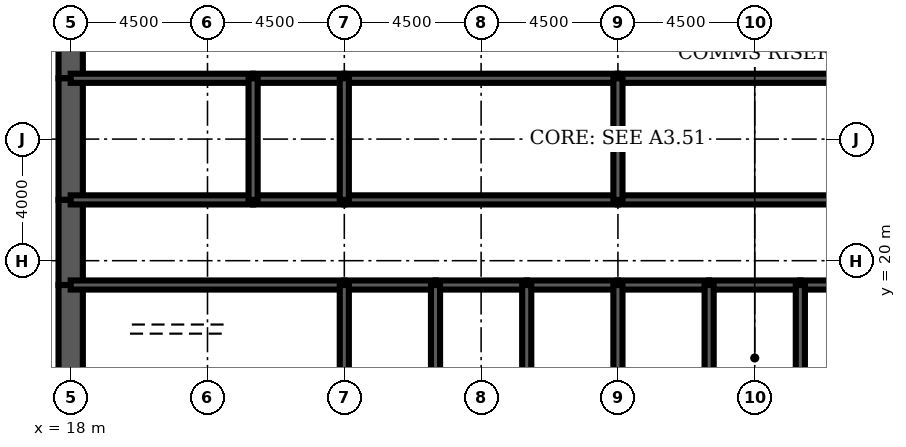
"""IFC4 building model, lengths in metres.
Left out: names, types, materials, properties, quantities, classifications, styles, units other than length and angle.
Written with IfcOpenShell. Run it as: python <this file> out.ifc"""

import sys

from ifc_helpers import new_model, si_unit, direction, frame, frame_2d, origin, place, context, subcontext, project, spatial, rectangle, extrude, element, fill, save


model = new_model("IFC4")
c1 = context("Model", 3, precision=1e-05, world=origin(), true_north=direction((0.0, 1.0)))
c2 = subcontext(c1, "Body", "Model", "MODEL_VIEW")
j1 = project(units=[si_unit("LENGTHUNIT", "METRE"), si_unit("PLANEANGLEUNIT", "RADIAN")], contexts=[c1])
p1 = place(None, origin())
s1 = spatial("IfcSite", under=j1, at=p1, CompositionType="ELEMENT")
p2 = place(p1, origin())
s2 = spatial("IfcBuilding", under=s1, at=p2, CompositionType="ELEMENT")
p3 = place(p2, frame((0.0, 0.0, 219.4)))
s3 = spatial("IfcBuildingStorey", under=s2, at=p3, CompositionType="ELEMENT", Elevation=219.4)
p4 = place(p3, frame((18.0, 28.8, 0.0), z_axis=(0.0, 0.0, 1.0), x_axis=(0.0, -1.0, 0.0)))
e1 = element("IfcWall", 1, at=p4, inside=s3, PredefinedType="SHEAR", context=c2, shape_type="SweptSolid", body=[
    extrude(rectangle(XDim=2.8, YDim=0.8, at=frame_2d((1.4, 0.0))), origin(), (0.0, 0.0, 1.0), 4.2),
])
p5 = place(p4, frame((0.4, 0.0, 0.0)))
e2 = element("IfcOpeningElement", 2, at=p5, cuts=e1, PredefinedType="OPENING", context=c2, shape_type="SweptSolid", body=[
    extrude(rectangle(XDim=1.8, YDim=2.1, at=frame_2d((0.9, 1.05))), frame((0.0, 0.41, 0.0), z_axis=(0.0, -1.0, 0.0), x_axis=(1.0, 0.0, 0.0)), (0.0, 0.0, 1.0), 0.82),
])
p6 = place(p3, frame((18.0, 26.0, 0.0), z_axis=(0.0, 0.0, 1.0), x_axis=(0.0, -1.0, 0.0)))
e3 = element("IfcWall", 3, at=p6, inside=s3, PredefinedType="SHEAR", context=c2, shape_type="SweptSolid", body=[
    extrude(rectangle(XDim=4.0, YDim=0.8, at=frame_2d((2.0, 0.0))), origin(), (0.0, 0.0, 1.0), 4.2),
])
p7 = place(p3, frame((18.0, 22.0, 0.0), z_axis=(0.0, 0.0, 1.0), x_axis=(0.0, -1.0, 0.0)))
e4 = element("IfcWall", 4, at=p7, inside=s3, PredefinedType="SHEAR", context=c2, shape_type="SweptSolid", body=[
    extrude(rectangle(XDim=2.8, YDim=0.8, at=frame_2d((1.4, 0.0))), origin(), (0.0, 0.0, 1.0), 4.2),
])
p8 = place(p7, frame((0.6, 0.0, 0.0)))
e5 = element("IfcOpeningElement", 5, at=p8, cuts=e4, PredefinedType="OPENING", context=c2, shape_type="SweptSolid", body=[
    extrude(rectangle(XDim=1.8, YDim=2.1, at=frame_2d((0.9, 1.05))), frame((0.0, 0.41, 0.0), z_axis=(0.0, -1.0, 0.0), x_axis=(1.0, 0.0, 0.0)), (0.0, 0.0, 1.0), 0.82),
])
p9 = place(p3, frame((18.0, 19.2, 0.0), z_axis=(0.0, 0.0, 1.0), x_axis=(0.0, -1.0, 0.0)))
e6 = element("IfcWall", 6, at=p9, inside=s3, PredefinedType="SHEAR", context=c2, shape_type="SweptSolid", body=[
    extrude(rectangle(XDim=3.2, YDim=0.8, at=frame_2d((1.6, 0.0))), origin(), (0.0, 0.0, 1.0), 4.2),
])
p10 = place(p3, frame((18.0, 19.2, 0.0), z_axis=(0.0, 0.0, 1.0), x_axis=(1.0, 0.0, 0.0)))
e7 = element("IfcWall", 7, at=p10, inside=s3, PredefinedType="SOLIDWALL", context=c2, shape_type="SweptSolid", body=[
    extrude(rectangle(XDim=9.0, YDim=0.3, at=frame_2d((4.5, 0.0))), origin(), (0.0, 0.0, 1.0), 4.2),
])
p11 = place(p10, frame((0.65, 0.0, 0.0)))
e8 = element("IfcOpeningElement", 8, at=p11, cuts=e7, PredefinedType="OPENING", context=c2, shape_type="SweptSolid", body=[
    extrude(rectangle(XDim=1.0, YDim=2.1, at=frame_2d((0.5, 1.05))), frame((0.0, 0.16, 0.0), z_axis=(0.0, -1.0, 0.0), x_axis=(1.0, 0.0, 0.0)), (0.0, 0.0, 1.0), 0.32),
])
p12 = place(p3, frame((27.0, 19.2, 0.0), z_axis=(0.0, 0.0, 1.0), x_axis=(1.0, 0.0, 0.0)))
e9 = element("IfcWall", 9, at=p12, inside=s3, PredefinedType="SOLIDWALL", context=c2, shape_type="SweptSolid", body=[
    extrude(rectangle(XDim=3.0, YDim=0.3, at=frame_2d((1.5, 0.0))), origin(), (0.0, 0.0, 1.0), 4.2),
])
p13 = place(p12, frame((0.95, 0.0, 0.0)))
e10 = element("IfcOpeningElement", 10, at=p13, cuts=e9, PredefinedType="OPENING", context=c2, shape_type="SweptSolid", body=[
    extrude(rectangle(XDim=1.1, YDim=2.2, at=frame_2d((0.55, 1.1))), frame((0.0, 0.16, 0.0), z_axis=(0.0, -1.0, 0.0), x_axis=(1.0, 0.0, 0.0)), (0.0, 0.0, 1.0), 0.32),
])
p14 = place(p3, frame((30.0, 19.2, 0.0), z_axis=(0.0, 0.0, 1.0), x_axis=(1.0, 0.0, 0.0)))
e11 = element("IfcWall", 11, at=p14, inside=s3, PredefinedType="SOLIDWALL", context=c2, shape_type="SweptSolid", body=[
    extrude(rectangle(XDim=3.0, YDim=0.3, at=frame_2d((1.5, 0.0))), origin(), (0.0, 0.0, 1.0), 4.2),
])
p15 = place(p14, frame((0.95, 0.0, 0.0)))
e12 = element("IfcOpeningElement", 12, at=p15, cuts=e11, PredefinedType="OPENING", context=c2, shape_type="SweptSolid", body=[
    extrude(rectangle(XDim=1.1, YDim=2.2, at=frame_2d((0.55, 1.1))), frame((0.0, 0.16, 0.0), z_axis=(0.0, -1.0, 0.0), x_axis=(1.0, 0.0, 0.0)), (0.0, 0.0, 1.0), 0.32),
])
p16 = place(p3, frame((33.0, 19.2, 0.0), z_axis=(0.0, 0.0, 1.0), x_axis=(1.0, 0.0, 0.0)))
e13 = element("IfcWall", 13, at=p16, inside=s3, PredefinedType="SOLIDWALL", context=c2, shape_type="SweptSolid", body=[
    extrude(rectangle(XDim=3.0, YDim=0.3, at=frame_2d((1.5, 0.0))), origin(), (0.0, 0.0, 1.0), 4.2),
])
p17 = place(p16, frame((0.95, 0.0, 0.0)))
e14 = element("IfcOpeningElement", 14, at=p17, cuts=e13, PredefinedType="OPENING", context=c2, shape_type="SweptSolid", body=[
    extrude(rectangle(XDim=1.1, YDim=2.2, at=frame_2d((0.55, 1.1))), frame((0.0, 0.16, 0.0), z_axis=(0.0, -1.0, 0.0), x_axis=(1.0, 0.0, 0.0)), (0.0, 0.0, 1.0), 0.32),
])
p18 = place(p3, frame((36.0, 19.2, 0.0), z_axis=(0.0, 0.0, 1.0), x_axis=(1.0, 0.0, 0.0)))
e15 = element("IfcWall", 15, at=p18, inside=s3, PredefinedType="SOLIDWALL", context=c2, shape_type="SweptSolid", body=[
    extrude(rectangle(XDim=3.0, YDim=0.3, at=frame_2d((1.5, 0.0))), origin(), (0.0, 0.0, 1.0), 4.2),
])
p19 = place(p18, frame((0.95, 0.0, 0.0)))
e16 = element("IfcOpeningElement", 16, at=p19, cuts=e15, PredefinedType="OPENING", context=c2, shape_type="SweptSolid", body=[
    extrude(rectangle(XDim=1.1, YDim=2.2, at=frame_2d((0.55, 1.1))), frame((0.0, 0.16, 0.0), z_axis=(0.0, -1.0, 0.0), x_axis=(1.0, 0.0, 0.0)), (0.0, 0.0, 1.0), 0.32),
])
p20 = place(p3, frame((39.0, 19.2, 0.0), z_axis=(0.0, 0.0, 1.0), x_axis=(1.0, 0.0, 0.0)))
e17 = element("IfcWall", 17, at=p20, inside=s3, PredefinedType="SOLIDWALL", context=c2, shape_type="SweptSolid", body=[
    extrude(rectangle(XDim=3.0, YDim=0.3, at=frame_2d((1.5, 0.0))), origin(), (0.0, 0.0, 1.0), 4.2),
])
p21 = place(p20, frame((1.0, 0.0, 0.0)))
e18 = element("IfcOpeningElement", 18, at=p21, cuts=e17, PredefinedType="OPENING", context=c2, shape_type="SweptSolid", body=[
    extrude(rectangle(XDim=1.0, YDim=2.1, at=frame_2d((0.5, 1.05))), frame((0.0, 0.16, 0.0), z_axis=(0.0, -1.0, 0.0), x_axis=(1.0, 0.0, 0.0)), (0.0, 0.0, 1.0), 0.32),
])
p22 = place(p3, frame((42.0, 19.2, 0.0), z_axis=(0.0, 0.0, 1.0), x_axis=(1.0, 0.0, 0.0)))
e19 = element("IfcWall", 19, at=p22, inside=s3, PredefinedType="SOLIDWALL", context=c2, shape_type="SweptSolid", body=[
    extrude(rectangle(XDim=3.0, YDim=0.3, at=frame_2d((1.5, 0.0))), origin(), (0.0, 0.0, 1.0), 4.2),
])
p23 = place(p22, frame((1.0, 0.0, 0.0)))
e20 = element("IfcOpeningElement", 20, at=p23, cuts=e19, PredefinedType="OPENING", context=c2, shape_type="SweptSolid", body=[
    extrude(rectangle(XDim=1.0, YDim=2.1, at=frame_2d((0.5, 1.05))), frame((0.0, 0.16, 0.0), z_axis=(0.0, -1.0, 0.0), x_axis=(1.0, 0.0, 0.0)), (0.0, 0.0, 1.0), 0.32),
])
p24 = place(p3, frame((18.0, 22.0, 0.0), z_axis=(0.0, 0.0, 1.0), x_axis=(1.0, 0.0, 0.0)))
e21 = element("IfcWall", 21, at=p24, inside=s3, PredefinedType="SOLIDWALL", context=c2, shape_type="SweptSolid", body=[
    extrude(rectangle(XDim=6.0, YDim=0.3, at=frame_2d((3.0, 0.0))), origin(), (0.0, 0.0, 1.0), 4.2),
])
p25 = place(p24, frame((4.4, 0.0, 0.0)))
e22 = element("IfcOpeningElement", 22, at=p25, cuts=e21, PredefinedType="OPENING", context=c2, shape_type="SweptSolid", body=[
    extrude(rectangle(XDim=1.0, YDim=2.1, at=frame_2d((0.5, 1.05))), frame((0.0, 0.16, 0.0), z_axis=(0.0, -1.0, 0.0), x_axis=(1.0, 0.0, 0.0)), (0.0, 0.0, 1.0), 0.32),
])
p26 = place(p24, frame((0.8, 0.0, 0.0)))
e23 = element("IfcOpeningElement", 23, at=p26, cuts=e21, PredefinedType="OPENING", context=c2, shape_type="SweptSolid", body=[
    extrude(rectangle(XDim=1.0, YDim=2.1, at=frame_2d((0.5, 1.05))), frame((0.0, 0.16, 0.0), z_axis=(0.0, -1.0, 0.0), x_axis=(1.0, 0.0, 0.0)), (0.0, 0.0, 1.0), 0.32),
])
p27 = place(p3, frame((24.0, 22.0, 0.0), z_axis=(0.0, 0.0, 1.0), x_axis=(1.0, 0.0, 0.0)))
e24 = element("IfcWall", 24, at=p27, inside=s3, PredefinedType="SOLIDWALL", context=c2, shape_type="SweptSolid", body=[
    extrude(rectangle(XDim=3.0, YDim=0.3, at=frame_2d((1.5, 0.0))), origin(), (0.0, 0.0, 1.0), 4.2),
])
p28 = place(p27, frame((1.0, 0.0, 0.0)))
e25 = element("IfcOpeningElement", 25, at=p28, cuts=e24, PredefinedType="OPENING", context=c2, shape_type="SweptSolid", body=[
    extrude(rectangle(XDim=1.0, YDim=2.1, at=frame_2d((0.5, 1.05))), frame((0.0, 0.16, 0.0), z_axis=(0.0, -1.0, 0.0), x_axis=(1.0, 0.0, 0.0)), (0.0, 0.0, 1.0), 0.32),
])
p29 = place(p3, frame((27.0, 22.0, 0.0), z_axis=(0.0, 0.0, 1.0), x_axis=(1.0, 0.0, 0.0)))
e26 = element("IfcWall", 26, at=p29, inside=s3, PredefinedType="SOLIDWALL", context=c2, shape_type="SweptSolid", body=[
    extrude(rectangle(XDim=9.0, YDim=0.3, at=frame_2d((4.5, 0.0))), origin(), (0.0, 0.0, 1.0), 4.2),
])
p30 = place(p29, frame((4.0, 0.0, 0.0)))
e27 = element("IfcOpeningElement", 27, at=p30, cuts=e26, PredefinedType="OPENING", context=c2, shape_type="SweptSolid", body=[
    extrude(rectangle(XDim=1.0, YDim=2.1, at=frame_2d((0.5, 1.05))), frame((0.0, 0.16, 0.0), z_axis=(0.0, -1.0, 0.0), x_axis=(1.0, 0.0, 0.0)), (0.0, 0.0, 1.0), 0.32),
])
p31 = place(p3, frame((36.0, 22.0, 0.0), z_axis=(0.0, 0.0, 1.0), x_axis=(1.0, 0.0, 0.0)))
e28 = element("IfcWall", 28, at=p31, inside=s3, PredefinedType="SOLIDWALL", context=c2, shape_type="SweptSolid", body=[
    extrude(rectangle(XDim=9.0, YDim=0.3, at=frame_2d((4.5, 0.0))), origin(), (0.0, 0.0, 1.0), 4.2),
])
p32 = place(p31, frame((4.0, 0.0, 0.0)))
e29 = element("IfcOpeningElement", 29, at=p32, cuts=e28, PredefinedType="OPENING", context=c2, shape_type="SweptSolid", body=[
    extrude(rectangle(XDim=1.0, YDim=2.1, at=frame_2d((0.5, 1.05))), frame((0.0, 0.16, 0.0), z_axis=(0.0, -1.0, 0.0), x_axis=(1.0, 0.0, 0.0)), (0.0, 0.0, 1.0), 0.32),
])
p33 = place(p3, frame((18.0, 26.0, 0.0), z_axis=(0.0, 0.0, 1.0), x_axis=(1.0, 0.0, 0.0)))
e30 = element("IfcWall", 30, at=p33, inside=s3, PredefinedType="SOLIDWALL", context=c2, shape_type="SweptSolid", body=[
    extrude(rectangle(XDim=6.0, YDim=0.3, at=frame_2d((3.0, 0.0))), origin(), (0.0, 0.0, 1.0), 4.2),
])
p34 = place(p3, frame((24.0, 26.0, 0.0), z_axis=(0.0, 0.0, 1.0), x_axis=(1.0, 0.0, 0.0)))
e31 = element("IfcWall", 31, at=p34, inside=s3, PredefinedType="SOLIDWALL", context=c2, shape_type="SweptSolid", body=[
    extrude(rectangle(XDim=3.0, YDim=0.3, at=frame_2d((1.5, 0.0))), origin(), (0.0, 0.0, 1.0), 4.2),
])
for number, where, z_axis, x_axis in (
    (32, (27.0, 26.0, 0.0), (0.0, 0.0, 1.0), (1.0, 0.0, 0.0)),
    (33, (36.0, 26.0, 0.0), (0.0, 0.0, 1.0), (1.0, 0.0, 0.0)),
):
    element("IfcWall", number, at=place(p3, frame(where, z_axis=z_axis, x_axis=x_axis)), inside=s3, PredefinedType="SOLIDWALL", context=c2, shape_type="SweptSolid", body=[
        extrude(rectangle(XDim=9.0, YDim=0.3, at=frame_2d((4.5, 0.0))), origin(), (0.0, 0.0, 1.0), 4.2),
    ])
for number, where, z_axis, x_axis in (
    (34, (27.0, 16.0, 0.0), (0.0, 0.0, 1.0), (0.0, 1.0, 0.0)),
    (35, (30.0, 16.0, 0.0), (0.0, 0.0, 1.0), (0.0, 1.0, 0.0)),
    (36, (33.0, 16.0, 0.0), (0.0, 0.0, 1.0), (0.0, 1.0, 0.0)),
    (37, (36.0, 16.0, 0.0), (0.0, 0.0, 1.0), (0.0, 1.0, 0.0)),
    (38, (39.0, 16.0, 0.0), (0.0, 0.0, 1.0), (0.0, 1.0, 0.0)),
    (39, (42.0, 16.0, 0.0), (0.0, 0.0, 1.0), (0.0, 1.0, 0.0)),
):
    element("IfcWall", number, at=place(p3, frame(where, z_axis=z_axis, x_axis=x_axis)), inside=s3, PredefinedType="SOLIDWALL", context=c2, shape_type="SweptSolid", body=[
        extrude(rectangle(XDim=3.2, YDim=0.3, at=frame_2d((1.6, 0.0))), origin(), (0.0, 0.0, 1.0), 4.2),
    ])
for number, where, z_axis, x_axis in (
    (40, (24.0, 22.0, 0.0), (0.0, 0.0, 1.0), (0.0, 1.0, 0.0)),
    (41, (27.0, 22.0, 0.0), (0.0, 0.0, 1.0), (0.0, 1.0, 0.0)),
    (42, (36.0, 22.0, 0.0), (0.0, 0.0, 1.0), (0.0, 1.0, 0.0)),
):
    element("IfcWall", number, at=place(p3, frame(where, z_axis=z_axis, x_axis=x_axis)), inside=s3, PredefinedType="SOLIDWALL", context=c2, shape_type="SweptSolid", body=[
        extrude(rectangle(XDim=4.0, YDim=0.3, at=frame_2d((2.0, 0.0))), origin(), (0.0, 0.0, 1.0), 4.2),
    ])
p35 = place(p3, frame((39.15, 17.35, 0.0), z_axis=(0.0, 0.0, 1.0), x_axis=(1.0, 0.0, 0.0)))
e43 = element("IfcWall", 43, at=p35, inside=s3, PredefinedType="SOLIDWALL", context=c2, shape_type="SweptSolid", body=[
    extrude(rectangle(XDim=2.7, YDim=0.3, at=frame_2d((1.35, 0.0))), origin(), (0.0, 0.0, 1.0), 4.04),
])
p36 = place(p35, frame((0.85, 0.0, 0.0)))
e44 = element("IfcOpeningElement", 44, at=p36, cuts=e43, PredefinedType="OPENING", context=c2, shape_type="SweptSolid", body=[
    extrude(rectangle(XDim=1.0, YDim=2.1, at=frame_2d((0.5, 1.05))), frame((0.0, 0.16, 0.0), z_axis=(0.0, -1.0, 0.0), x_axis=(1.0, 0.0, 0.0)), (0.0, 0.0, 1.0), 0.32),
])
p37 = place(p3, frame((42.15, 17.35, 0.0), z_axis=(0.0, 0.0, 1.0), x_axis=(1.0, 0.0, 0.0)))
e45 = element("IfcWall", 45, at=p37, inside=s3, PredefinedType="SOLIDWALL", context=c2, shape_type="SweptSolid", body=[
    extrude(rectangle(XDim=2.7, YDim=0.3, at=frame_2d((1.35, 0.0))), origin(), (0.0, 0.0, 1.0), 4.04),
])
p38 = place(p37, frame((0.85, 0.0, 0.0)))
e46 = element("IfcOpeningElement", 46, at=p38, cuts=e45, PredefinedType="OPENING", context=c2, shape_type="SweptSolid", body=[
    extrude(rectangle(XDim=1.0, YDim=2.1, at=frame_2d((0.5, 1.05))), frame((0.0, 0.16, 0.0), z_axis=(0.0, -1.0, 0.0), x_axis=(1.0, 0.0, 0.0)), (0.0, 0.0, 1.0), 0.32),
])
p39 = place(p3, frame((38.5, 22.15, 0.0), z_axis=(0.0, 0.0, 1.0), x_axis=(0.0, 1.0, 0.0)))
e47 = element("IfcWall", 47, at=p39, inside=s3, PredefinedType="PARTITIONING", context=c2, shape_type="SweptSolid", body=[
    extrude(rectangle(XDim=3.7, YDim=0.15, at=frame_2d((1.85, 0.0))), origin(), (0.0, 0.0, 1.0), 3.0),
])
p40 = place(p39, frame((2.2, 0.0, 0.0)))
e48 = element("IfcOpeningElement", 48, at=p40, cuts=e47, PredefinedType="OPENING", context=c2, shape_type="SweptSolid", body=[
    extrude(rectangle(XDim=1.0, YDim=2.1, at=frame_2d((0.5, 1.05))), frame((0.0, 0.085, 0.0), z_axis=(0.0, -1.0, 0.0), x_axis=(1.0, 0.0, 0.0)), (0.0, 0.0, 1.0), 0.17),
])
p41 = place(p3, frame((20.275, 22.15, 0.0), z_axis=(0.0, 0.0, 1.0), x_axis=(0.0, 1.0, 0.0)))
e49 = element("IfcWall", 49, at=p41, inside=s3, PredefinedType="PARTITIONING", context=c2, shape_type="SweptSolid", body=[
    extrude(rectangle(XDim=3.7, YDim=0.15, at=frame_2d((1.85, 0.0))), origin(), (0.0, 0.0, 1.0), 3.0),
])
p42 = place(p3, frame((24.5, 19.35, 0.0), z_axis=(0.0, 0.0, 1.0), x_axis=(0.0, 1.0, 0.0)))
e50 = element("IfcWall", 50, at=p42, inside=s3, PredefinedType="PARTITIONING", context=c2, shape_type="SweptSolid", body=[
    extrude(rectangle(XDim=2.5, YDim=0.15, at=frame_2d((1.25, 0.0))), origin(), (0.0, 0.0, 1.0), 3.0),
])
p43 = place(p42, frame((1.15, 0.0, 0.0)))
e51 = element("IfcOpeningElement", 51, at=p43, cuts=e50, PredefinedType="OPENING", context=c2, shape_type="SweptSolid", body=[
    extrude(rectangle(XDim=1.0, YDim=2.1, at=frame_2d((0.5, 1.05))), frame((0.0, 0.085, 0.0), z_axis=(0.0, -1.0, 0.0), x_axis=(1.0, 0.0, 0.0)), (0.0, 0.0, 1.0), 0.17),
])
p44 = place(p36, origin())
e52 = element("IfcDoor", 52, at=p44, inside=s3, OperationType="SINGLE_SWING_LEFT", PredefinedType="DOOR", context=c2, shape_type="SweptSolid", body=[
    extrude(rectangle(XDim=1.0, YDim=2.1, at=frame_2d((0.5, 1.05))), frame((0.0, 0.025, 0.0), z_axis=(0.0, -1.0, 0.0), x_axis=(1.0, 0.0, 0.0)), (0.0, 0.0, 1.0), 0.05),
])
fill(e44, e52)
p45 = place(p40, origin())
e53 = element("IfcDoor", 53, at=p45, inside=s3, OperationType="SINGLE_SWING_RIGHT", PredefinedType="DOOR", context=c2, shape_type="SweptSolid", body=[
    extrude(rectangle(XDim=1.0, YDim=2.1, at=frame_2d((0.5, 1.05))), frame((0.0, 0.025, 0.0), z_axis=(0.0, -1.0, 0.0), x_axis=(1.0, 0.0, 0.0)), (0.0, 0.0, 1.0), 0.05),
])
fill(e48, e53)
p46 = place(p43, origin())
e54 = element("IfcDoor", 54, at=p46, inside=s3, OperationType="SINGLE_SWING_RIGHT", PredefinedType="DOOR", context=c2, shape_type="SweptSolid", body=[
    extrude(rectangle(XDim=1.0, YDim=2.1, at=frame_2d((0.5, 1.05))), frame((0.0, 0.025, 0.0), z_axis=(0.0, -1.0, 0.0), x_axis=(1.0, 0.0, 0.0)), (0.0, 0.0, 1.0), 0.05),
])
fill(e51, e54)
p47 = place(p13, origin())
e55 = element("IfcDoor", 55, at=p47, inside=s3, OperationType="DOUBLE_DOOR_SLIDING", PredefinedType="USERDEFINED", context=c2, shape_type="SweptSolid", body=[
    extrude(rectangle(XDim=1.1, YDim=2.2, at=frame_2d((0.55, 1.1))), frame((0.0, 0.025, 0.0), z_axis=(0.0, -1.0, 0.0), x_axis=(1.0, 0.0, 0.0)), (0.0, 0.0, 1.0), 0.05),
])
fill(e10, e55)
p48 = place(p15, origin())
e56 = element("IfcDoor", 56, at=p48, inside=s3, OperationType="DOUBLE_DOOR_SLIDING", PredefinedType="USERDEFINED", context=c2, shape_type="SweptSolid", body=[
    extrude(rectangle(XDim=1.1, YDim=2.2, at=frame_2d((0.55, 1.1))), frame((0.0, 0.025, 0.0), z_axis=(0.0, -1.0, 0.0), x_axis=(1.0, 0.0, 0.0)), (0.0, 0.0, 1.0), 0.05),
])
fill(e12, e56)
p49 = place(p17, origin())
e57 = element("IfcDoor", 57, at=p49, inside=s3, OperationType="DOUBLE_DOOR_SLIDING", PredefinedType="USERDEFINED", context=c2, shape_type="SweptSolid", body=[
    extrude(rectangle(XDim=1.1, YDim=2.2, at=frame_2d((0.55, 1.1))), frame((0.0, 0.025, 0.0), z_axis=(0.0, -1.0, 0.0), x_axis=(1.0, 0.0, 0.0)), (0.0, 0.0, 1.0), 0.05),
])
fill(e14, e57)
p50 = place(p19, origin())
e58 = element("IfcDoor", 58, at=p50, inside=s3, OperationType="DOUBLE_DOOR_SLIDING", PredefinedType="USERDEFINED", context=c2, shape_type="SweptSolid", body=[
    extrude(rectangle(XDim=1.1, YDim=2.2, at=frame_2d((0.55, 1.1))), frame((0.0, 0.025, 0.0), z_axis=(0.0, -1.0, 0.0), x_axis=(1.0, 0.0, 0.0)), (0.0, 0.0, 1.0), 0.05),
])
fill(e16, e58)
p51 = place(p11, origin())
e59 = element("IfcDoor", 59, at=p51, inside=s3, OperationType="SINGLE_SWING_LEFT", PredefinedType="DOOR", context=c2, shape_type="SweptSolid", body=[
    extrude(rectangle(XDim=1.0, YDim=2.1, at=frame_2d((0.5, 1.05))), frame((0.0, 0.025, 0.0), z_axis=(0.0, -1.0, 0.0), x_axis=(1.0, 0.0, 0.0)), (0.0, 0.0, 1.0), 0.05),
])
fill(e8, e59)
p52 = place(p8, origin())
e60 = element("IfcDoor", 60, at=p52, inside=s3, OperationType="SINGLE_SWING_LEFT", PredefinedType="DOOR", context=c2, shape_type="SweptSolid", body=[
    extrude(rectangle(XDim=1.8, YDim=2.1, at=frame_2d((0.9, 1.05))), frame((0.0, 0.4, 0.0), z_axis=(0.0, -1.0, 0.0), x_axis=(1.0, 0.0, 0.0)), (0.0, 0.0, 1.0), 0.8),
])
fill(e5, e60)
p53 = place(p5, origin())
e61 = element("IfcDoor", 61, at=p53, inside=s3, OperationType="SINGLE_SWING_LEFT", PredefinedType="DOOR", context=c2, shape_type="SweptSolid", body=[
    extrude(rectangle(XDim=1.8, YDim=2.1, at=frame_2d((0.9, 1.05))), frame((0.0, 0.4, 0.0), z_axis=(0.0, -1.0, 0.0), x_axis=(1.0, 0.0, 0.0)), (0.0, 0.0, 1.0), 0.8),
])
fill(e2, e61)
p54 = place(p25, origin())
e62 = element("IfcDoor", 62, at=p54, inside=s3, OperationType="SINGLE_SWING_RIGHT", PredefinedType="DOOR", context=c2, shape_type="SweptSolid", body=[
    extrude(rectangle(XDim=1.0, YDim=2.1, at=frame_2d((0.5, 1.05))), frame((0.0, 0.025, 0.0), z_axis=(0.0, -1.0, 0.0), x_axis=(1.0, 0.0, 0.0)), (0.0, 0.0, 1.0), 0.05),
])
fill(e22, e62)
p55 = place(p28, origin())
e63 = element("IfcDoor", 63, at=p55, inside=s3, OperationType="SINGLE_SWING_LEFT", PredefinedType="DOOR", context=c2, shape_type="SweptSolid", body=[
    extrude(rectangle(XDim=1.0, YDim=2.1, at=frame_2d((0.5, 1.05))), frame((0.0, 0.025, 0.0), z_axis=(0.0, -1.0, 0.0), x_axis=(1.0, 0.0, 0.0)), (0.0, 0.0, 1.0), 0.05),
])
fill(e25, e63)
p56 = place(p30, origin())
e64 = element("IfcDoor", 64, at=p56, inside=s3, OperationType="SINGLE_SWING_LEFT", PredefinedType="DOOR", context=c2, shape_type="SweptSolid", body=[
    extrude(rectangle(XDim=1.0, YDim=2.1, at=frame_2d((0.5, 1.05))), frame((0.0, 0.025, 0.0), z_axis=(0.0, -1.0, 0.0), x_axis=(1.0, 0.0, 0.0)), (0.0, 0.0, 1.0), 0.05),
])
fill(e27, e64)
p57 = place(p32, origin())
e65 = element("IfcDoor", 65, at=p57, inside=s3, OperationType="SINGLE_SWING_LEFT", PredefinedType="DOOR", context=c2, shape_type="SweptSolid", body=[
    extrude(rectangle(XDim=1.0, YDim=2.1, at=frame_2d((0.5, 1.05))), frame((0.0, 0.025, 0.0), z_axis=(0.0, -1.0, 0.0), x_axis=(1.0, 0.0, 0.0)), (0.0, 0.0, 1.0), 0.05),
])
fill(e29, e65)
p58 = place(p26, origin())
e66 = element("IfcDoor", 66, at=p58, inside=s3, OperationType="SINGLE_SWING_LEFT", PredefinedType="DOOR", context=c2, shape_type="SweptSolid", body=[
    extrude(rectangle(XDim=1.0, YDim=2.1, at=frame_2d((0.5, 1.05))), frame((0.0, 0.025, 0.0), z_axis=(0.0, -1.0, 0.0), x_axis=(1.0, 0.0, 0.0)), (0.0, 0.0, 1.0), 0.05),
])
fill(e23, e66)
p59 = place(p21, origin())
e67 = element("IfcDoor", 67, at=p59, inside=s3, OperationType="SINGLE_SWING_LEFT", PredefinedType="DOOR", context=c2, shape_type="SweptSolid", body=[
    extrude(rectangle(XDim=1.0, YDim=2.1, at=frame_2d((0.5, 1.05))), frame((0.0, 0.025, 0.0), z_axis=(0.0, -1.0, 0.0), x_axis=(1.0, 0.0, 0.0)), (0.0, 0.0, 1.0), 0.05),
])
fill(e18, e67)
save(model, sys.argv[1])
